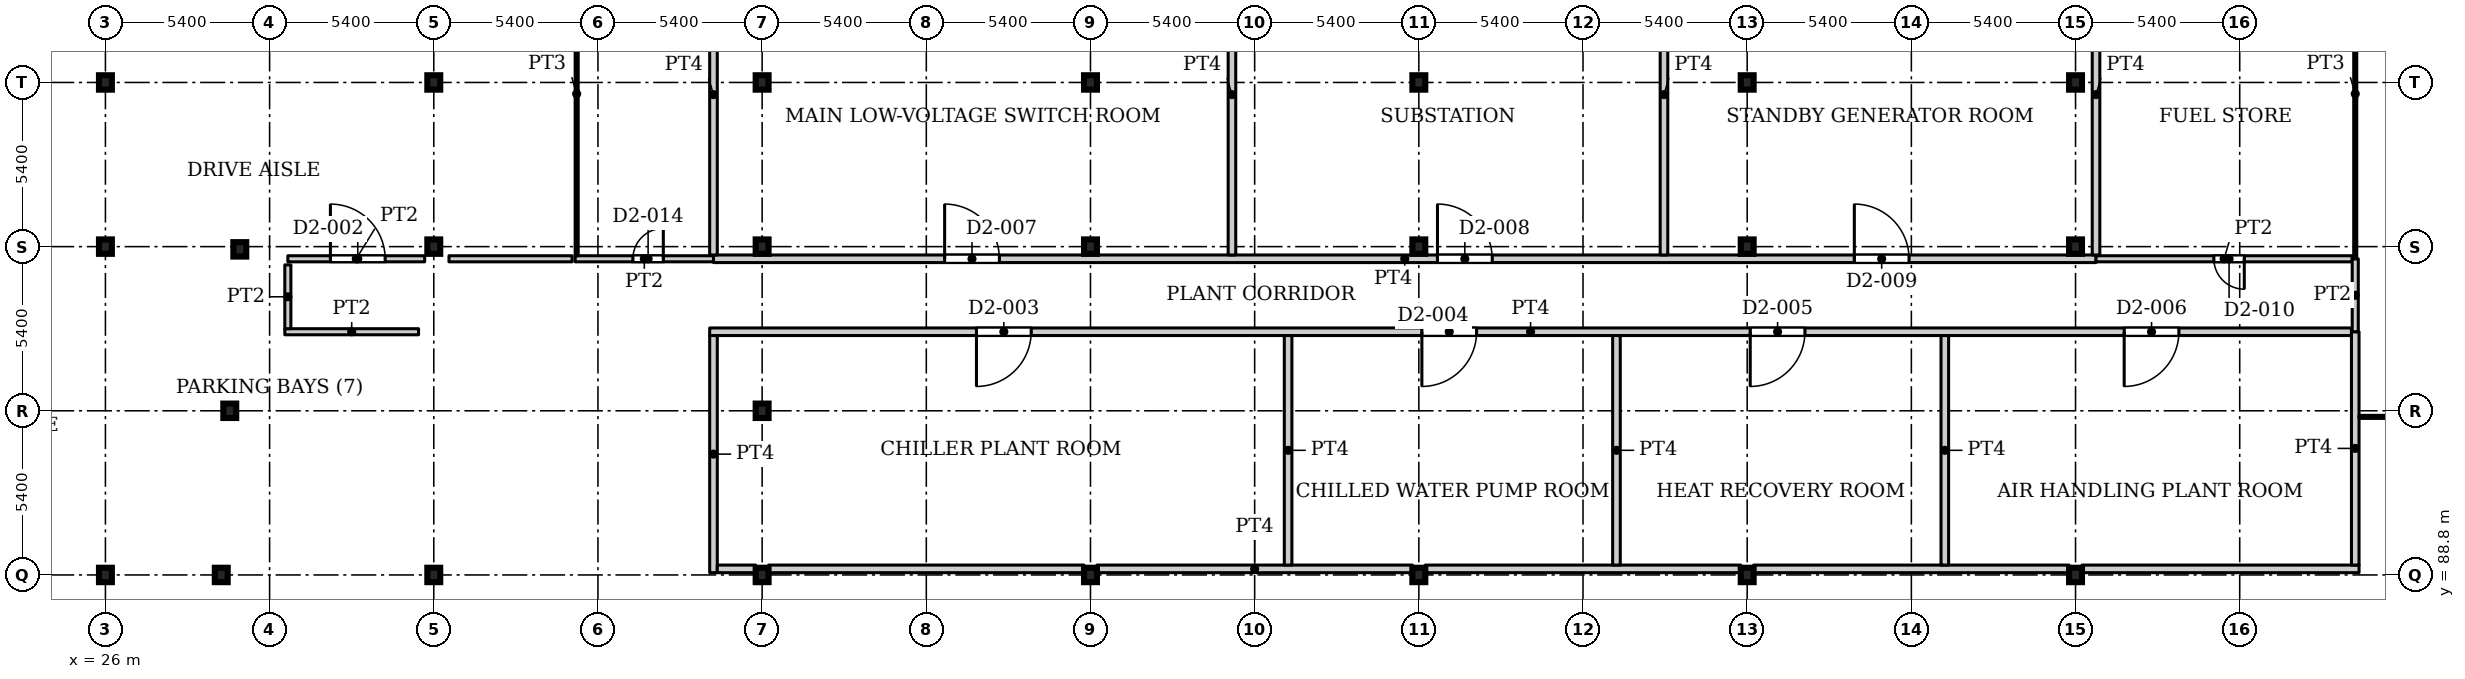
"""IFC4 building model, lengths in metres.
Left out: names, types, materials, properties, quantities, classifications, styles, units other than length and angle.
Written with IfcOpenShell. Run it as: python <this file> out.ifc"""

import sys

from ifc_helpers import new_model, si_unit, direction, frame, frame_2d, origin, origin_2d, place, context, subcontext, project, spatial, rectangle, i_section, extrude, source, transform, mapped, element, fill, save


model = new_model("IFC4")
c1 = context("Model", 3, precision=1e-05, world=origin(), true_north=direction((0.0, 1.0)))
c2 = subcontext(c1, "Body", "Model", "MODEL_VIEW")
j1 = project(units=[si_unit("LENGTHUNIT", "METRE"), si_unit("PLANEANGLEUNIT", "RADIAN")], contexts=[c1])
p1 = place(None, origin())
s1 = spatial("IfcSite", under=j1, at=p1, CompositionType="ELEMENT")
p2 = place(p1, origin())
s2 = spatial("IfcBuilding", under=s1, at=p2, CompositionType="ELEMENT")
p3 = place(p2, frame((0.0, 0.0, -10.0)))
s3 = spatial("IfcBuildingStorey", under=s2, at=p3, CompositionType="ELEMENT", Elevation=-10.0)
for number, where, z_axis, x_axis in (
    (1, (26.0, 88.8, 0.0), (0.0, 0.0, 1.0), (1.0, 0.0, 0.0)),
    (2, (36.8, 88.8, 0.0), (0.0, 0.0, 1.0), (1.0, 0.0, 0.0)),
    (3, (47.6, 88.8, 0.0), (0.0, 0.0, 1.0), (1.0, 0.0, 0.0)),
    (4, (58.4, 88.8, 0.0), (0.0, 0.0, 1.0), (1.0, 0.0, 0.0)),
    (5, (69.2, 88.8, 0.0), (0.0, 0.0, 1.0), (1.0, 0.0, 0.0)),
    (6, (80.0, 88.8, 0.0), (0.0, 0.0, 1.0), (1.0, 0.0, 0.0)),
    (7, (90.8, 88.8, 0.0), (0.0, 0.0, 1.0), (1.0, 0.0, 0.0)),
    (8, (26.0, 99.6, 0.0), (0.0, 0.0, 1.0), (1.0, 0.0, 0.0)),
    (9, (36.8, 99.6, 0.0), (0.0, 0.0, 1.0), (1.0, 0.0, 0.0)),
    (10, (47.6, 99.6, 0.0), (0.0, 0.0, 1.0), (1.0, 0.0, 0.0)),
    (11, (58.4, 99.6, 0.0), (0.0, 0.0, 1.0), (1.0, 0.0, 0.0)),
    (12, (69.2, 99.6, 0.0), (0.0, 0.0, 1.0), (1.0, 0.0, 0.0)),
    (13, (80.0, 99.6, 0.0), (0.0, 0.0, 1.0), (1.0, 0.0, 0.0)),
    (14, (90.8, 99.6, 0.0), (0.0, 0.0, 1.0), (1.0, 0.0, 0.0)),
    (15, (26.0, 105.0, 0.0), (0.0, 0.0, 1.0), (1.0, 0.0, 0.0)),
    (16, (36.8, 105.0, 0.0), (0.0, 0.0, 1.0), (1.0, 0.0, 0.0)),
    (17, (47.6, 105.0, 0.0), (0.0, 0.0, 1.0), (1.0, 0.0, 0.0)),
    (18, (58.4, 105.0, 0.0), (0.0, 0.0, 1.0), (1.0, 0.0, 0.0)),
    (19, (69.2, 105.0, 0.0), (0.0, 0.0, 1.0), (1.0, 0.0, 0.0)),
    (20, (80.0, 105.0, 0.0), (0.0, 0.0, 1.0), (1.0, 0.0, 0.0)),
    (21, (90.8, 105.0, 0.0), (0.0, 0.0, 1.0), (1.0, 0.0, 0.0)),
    (22, (29.81, 88.8, 0.0), (0.0, 0.0, 1.0), (1.0, 0.0, 0.0)),
    (23, (30.09, 94.2, 0.0), (0.0, 0.0, 1.0), (1.0, 0.0, 0.0)),
    (24, (47.6, 94.2, 0.0), (0.0, 0.0, 1.0), (1.0, 0.0, 0.0)),
    (25, (30.42, 99.51, 0.0), (0.0, 0.0, 1.0), (1.0, 0.0, 0.0)),
):
    element("IfcColumn", number, at=place(p3, frame(where, z_axis=z_axis, x_axis=x_axis)), inside=s3, PredefinedType="COLUMN", context=c2, shape_type="SweptSolid", body=[
        extrude(i_section(OverallWidth=0.424, OverallDepth=0.474, WebThickness=0.048, FlangeThickness=0.077, FilletRadius=0.014, at=origin_2d()), origin(), (0.0, 0.0, 1.0), 5.0),
    ])
p4 = place(p3, frame((31.9, 96.8, 0.0), z_axis=(0.0, 0.0, 1.0), x_axis=(1.0, 0.0, 0.0)))
e26 = element("IfcWall", 26, at=p4, inside=s3, PredefinedType="PARTITIONING", context=c2, shape_type="SweptSolid", body=[
    extrude(rectangle(XDim=4.4, YDim=0.2, at=frame_2d((2.2, 0.0))), origin(), (0.0, 0.0, 1.0), 4.58),
])
p5 = place(p3, frame((32.0, 96.9, 0.0), z_axis=(0.0, 0.0, 1.0), x_axis=(0.0, 1.0, 0.0)))
e27 = element("IfcWall", 27, at=p5, inside=s3, PredefinedType="PARTITIONING", context=c2, shape_type="SweptSolid", body=[
    extrude(rectangle(XDim=2.1, YDim=0.2, at=frame_2d((1.05, 0.0))), origin(), (0.0, 0.0, 1.0), 4.58),
])
p6 = place(p3, frame((32.0, 99.2, 0.0), z_axis=(0.0, 0.0, 1.0), x_axis=(1.0, 0.0, 0.0)))
e28 = element("IfcWall", 28, at=p6, inside=s3, PredefinedType="PARTITIONING", context=c2, shape_type="SweptSolid", body=[
    extrude(rectangle(XDim=4.5, YDim=0.2, at=frame_2d((2.25, 0.0))), origin(), (0.0, 0.0, 1.0), 4.58),
])
p7 = place(p6, frame((1.4, 0.0, 0.0)))
e29 = element("IfcOpeningElement", 29, at=p7, cuts=e28, PredefinedType="OPENING", context=c2, shape_type="SweptSolid", body=[
    extrude(rectangle(XDim=1.8, YDim=2.1, at=frame_2d((0.9, 1.05))), frame((0.0, 0.11, 0.0), z_axis=(0.0, -1.0, 0.0), x_axis=(1.0, 0.0, 0.0)), (0.0, 0.0, 1.0), 0.22),
])
p8 = place(p3, frame((37.3, 99.2, 0.0), z_axis=(0.0, 0.0, 1.0), x_axis=(1.0, 0.0, 0.0)))
e30 = element("IfcWall", 30, at=p8, inside=s3, PredefinedType="PARTITIONING", context=c2, shape_type="SweptSolid", body=[
    extrude(rectangle(XDim=4.05, YDim=0.2, at=frame_2d((2.025, 0.0))), origin(), (0.0, 0.0, 1.0), 4.58),
])
p9 = place(p3, frame((41.45, 99.2, 0.0), z_axis=(0.0, 0.0, 1.0), x_axis=(1.0, 0.0, 0.0)))
e31 = element("IfcWall", 31, at=p9, inside=s3, PredefinedType="PARTITIONING", context=c2, shape_type="SweptSolid", body=[
    extrude(rectangle(XDim=4.55, YDim=0.2, at=frame_2d((2.275, 0.0))), origin(), (0.0, 0.0, 1.0), 4.58),
])
p10 = place(p9, frame((1.9, 0.0, 0.0)))
e32 = element("IfcOpeningElement", 32, at=p10, cuts=e31, PredefinedType="OPENING", context=c2, shape_type="SweptSolid", body=[
    extrude(rectangle(XDim=1.0, YDim=2.1, at=frame_2d((0.5, 1.05))), frame((0.0, 0.11, 0.0), z_axis=(0.0, -1.0, 0.0), x_axis=(1.0, 0.0, 0.0)), (0.0, 0.0, 1.0), 0.22),
])
p11 = place(p3, frame((41.5, 99.3, 0.0), z_axis=(0.0, 0.0, 1.0), x_axis=(0.0, 1.0, 0.0)))
e33 = element("IfcWall", 33, at=p11, inside=s3, PredefinedType="PARTITIONING", context=c2, shape_type="SweptSolid", body=[
    extrude(rectangle(XDim=10.65, YDim=0.1, at=frame_2d((5.325, 0.0))), origin(), (0.0, 0.0, 1.0), 4.58),
])
p12 = place(p3, frame((45.875, 96.8, 0.0), z_axis=(0.0, 0.0, 1.0), x_axis=(1.0, 0.0, 0.0)))
e34 = element("IfcWall", 34, at=p12, inside=s3, PredefinedType="PARTITIONING", context=c2, shape_type="SweptSolid", body=[
    extrude(rectangle(XDim=54.0, YDim=0.25, at=frame_2d((27.0, 0.0))), origin(), (0.0, 0.0, 1.0), 4.58),
])
p13 = place(p12, frame((8.775, 0.0, 0.0)))
e35 = element("IfcOpeningElement", 35, at=p13, cuts=e34, PredefinedType="OPENING", context=c2, shape_type="SweptSolid", body=[
    extrude(rectangle(XDim=1.8, YDim=2.1, at=frame_2d((0.9, 1.05))), frame((0.0, 0.135, 0.0), z_axis=(0.0, -1.0, 0.0), x_axis=(1.0, 0.0, 0.0)), (0.0, 0.0, 1.0), 0.27),
])
p14 = place(p12, frame((23.425, 0.0, 0.0)))
e36 = element("IfcOpeningElement", 36, at=p14, cuts=e34, PredefinedType="OPENING", context=c2, shape_type="SweptSolid", body=[
    extrude(rectangle(XDim=1.8, YDim=2.1, at=frame_2d((0.9, 1.05))), frame((0.0, 0.135, 0.0), z_axis=(0.0, -1.0, 0.0), x_axis=(1.0, 0.0, 0.0)), (0.0, 0.0, 1.0), 0.27),
])
p15 = place(p12, frame((34.225, 0.0, 0.0)))
e37 = element("IfcOpeningElement", 37, at=p15, cuts=e34, PredefinedType="OPENING", context=c2, shape_type="SweptSolid", body=[
    extrude(rectangle(XDim=1.8, YDim=2.1, at=frame_2d((0.9, 1.05))), frame((0.0, 0.135, 0.0), z_axis=(0.0, -1.0, 0.0), x_axis=(1.0, 0.0, 0.0)), (0.0, 0.0, 1.0), 0.27),
])
p16 = place(p12, frame((46.525, 0.0, 0.0)))
e38 = element("IfcOpeningElement", 38, at=p16, cuts=e34, PredefinedType="OPENING", context=c2, shape_type="SweptSolid", body=[
    extrude(rectangle(XDim=1.8, YDim=2.1, at=frame_2d((0.9, 1.05))), frame((0.0, 0.135, 0.0), z_axis=(0.0, -1.0, 0.0), x_axis=(1.0, 0.0, 0.0)), (0.0, 0.0, 1.0), 0.27),
])
p17 = place(p3, frame((46.0, 88.875, 0.0), z_axis=(0.0, 0.0, 1.0), x_axis=(0.0, 1.0, 0.0)))
e39 = element("IfcWall", 39, at=p17, inside=s3, PredefinedType="PARTITIONING", context=c2, shape_type="SweptSolid", body=[
    extrude(rectangle(XDim=7.8, YDim=0.25, at=frame_2d((3.9, 0.0))), origin(), (0.0, 0.0, 1.0), 4.58),
])
p18 = place(p3, frame((46.0, 99.2, 0.0), z_axis=(0.0, 0.0, 1.0), x_axis=(1.0, 0.0, 0.0)))
e40 = element("IfcWall", 40, at=p18, inside=s3, PredefinedType="PARTITIONING", context=c2, shape_type="SweptSolid", body=[
    extrude(rectangle(XDim=45.474, YDim=0.25, at=frame_2d((22.737, 0.0))), origin(), (0.0, 0.0, 1.0), 4.58),
])
p19 = place(p18, frame((7.603, 0.0, 0.0)))
e41 = element("IfcOpeningElement", 41, at=p19, cuts=e40, PredefinedType="OPENING", context=c2, shape_type="SweptSolid", body=[
    extrude(rectangle(XDim=1.8, YDim=2.1, at=frame_2d((0.9, 1.05))), frame((0.0, 0.135, 0.0), z_axis=(0.0, -1.0, 0.0), x_axis=(1.0, 0.0, 0.0)), (0.0, 0.0, 1.0), 0.27),
])
p20 = place(p18, frame((23.813, 0.0, 0.0)))
e42 = element("IfcOpeningElement", 42, at=p20, cuts=e40, PredefinedType="OPENING", context=c2, shape_type="SweptSolid", body=[
    extrude(rectangle(XDim=1.8, YDim=2.1, at=frame_2d((0.9, 1.05))), frame((0.0, 0.135, 0.0), z_axis=(0.0, -1.0, 0.0), x_axis=(1.0, 0.0, 0.0)), (0.0, 0.0, 1.0), 0.27),
])
p21 = place(p18, frame((37.524, 0.0, 0.0)))
e43 = element("IfcOpeningElement", 43, at=p21, cuts=e40, PredefinedType="OPENING", context=c2, shape_type="SweptSolid", body=[
    extrude(rectangle(XDim=1.8, YDim=2.1, at=frame_2d((0.9, 1.05))), frame((0.0, 0.135, 0.0), z_axis=(0.0, -1.0, 0.0), x_axis=(1.0, 0.0, 0.0)), (0.0, 0.0, 1.0), 0.27),
])
p22 = place(p3, frame((46.0, 99.325, 0.0), z_axis=(0.0, 0.0, 1.0), x_axis=(0.0, 1.0, 0.0)))
e44 = element("IfcWall", 44, at=p22, inside=s3, PredefinedType="PARTITIONING", context=c2, shape_type="SweptSolid", body=[
    extrude(rectangle(XDim=10.55, YDim=0.25, at=frame_2d((5.275, 0.0))), origin(), (0.0, 0.0, 1.0), 4.58),
])
p23 = place(p3, frame((46.125, 89.0, 0.0), z_axis=(0.0, 0.0, 1.0), x_axis=(1.0, 0.0, 0.0)))
e45 = element("IfcWall", 45, at=p23, inside=s3, PredefinedType="PARTITIONING", context=c2, shape_type="SweptSolid", body=[
    extrude(rectangle(XDim=1.264, YDim=0.25, at=frame_2d((0.632, 0.0))), origin(), (0.0, 0.0, 1.0), 4.58),
])
for number, where, z_axis, x_axis in (
    (46, (47.811, 89.0, 0.0), (0.0, 0.0, 1.0), (1.0, 0.0, 0.0)),
    (47, (58.611, 89.0, 0.0), (0.0, 0.0, 1.0), (1.0, 0.0, 0.0)),
):
    element("IfcWall", number, at=place(p3, frame(where, z_axis=z_axis, x_axis=x_axis)), inside=s3, PredefinedType="PARTITIONING", context=c2, shape_type="SweptSolid", body=[
        extrude(rectangle(XDim=10.378, YDim=0.25, at=frame_2d((5.189, 0.0))), origin(), (0.0, 0.0, 1.0), 4.58),
    ])
p24 = place(p3, frame((63.053, 99.325, 0.0), z_axis=(0.0, 0.0, 1.0), x_axis=(0.0, 1.0, 0.0)))
e48 = element("IfcWall", 48, at=p24, inside=s3, PredefinedType="PARTITIONING", context=c2, shape_type="SweptSolid", body=[
    extrude(rectangle(XDim=10.55, YDim=0.25, at=frame_2d((5.275, 0.0))), origin(), (0.0, 0.0, 1.0), 4.58),
])
p25 = place(p3, frame((64.9, 89.125, 0.0), z_axis=(0.0, 0.0, 1.0), x_axis=(0.0, 1.0, 0.0)))
e49 = element("IfcWall", 49, at=p25, inside=s3, PredefinedType="PARTITIONING", context=c2, shape_type="SweptSolid", body=[
    extrude(rectangle(XDim=7.55, YDim=0.25, at=frame_2d((3.775, 0.0))), origin(), (0.0, 0.0, 1.0), 4.58),
])
p26 = place(p3, frame((69.411, 89.0, 0.0), z_axis=(0.0, 0.0, 1.0), x_axis=(1.0, 0.0, 0.0)))
e50 = element("IfcWall", 50, at=p26, inside=s3, PredefinedType="PARTITIONING", context=c2, shape_type="SweptSolid", body=[
    extrude(rectangle(XDim=10.378, YDim=0.25, at=frame_2d((5.189, 0.0))), origin(), (0.0, 0.0, 1.0), 4.58),
])
p27 = place(p3, frame((75.7, 89.125, 0.0), z_axis=(0.0, 0.0, 1.0), x_axis=(0.0, 1.0, 0.0)))
e51 = element("IfcWall", 51, at=p27, inside=s3, PredefinedType="PARTITIONING", context=c2, shape_type="SweptSolid", body=[
    extrude(rectangle(XDim=7.55, YDim=0.25, at=frame_2d((3.775, 0.0))), origin(), (0.0, 0.0, 1.0), 4.58),
])
p28 = place(p3, frame((77.263, 99.325, 0.0), z_axis=(0.0, 0.0, 1.0), x_axis=(0.0, 1.0, 0.0)))
e52 = element("IfcWall", 52, at=p28, inside=s3, PredefinedType="PARTITIONING", context=c2, shape_type="SweptSolid", body=[
    extrude(rectangle(XDim=10.55, YDim=0.25, at=frame_2d((5.275, 0.0))), origin(), (0.0, 0.0, 1.0), 4.58),
])
p29 = place(p3, frame((80.211, 89.0, 0.0), z_axis=(0.0, 0.0, 1.0), x_axis=(1.0, 0.0, 0.0)))
e53 = element("IfcWall", 53, at=p29, inside=s3, PredefinedType="PARTITIONING", context=c2, shape_type="SweptSolid", body=[
    extrude(rectangle(XDim=10.378, YDim=0.25, at=frame_2d((5.189, 0.0))), origin(), (0.0, 0.0, 1.0), 4.58),
])
p30 = place(p3, frame((86.5, 89.125, 0.0), z_axis=(0.0, 0.0, 1.0), x_axis=(0.0, 1.0, 0.0)))
e54 = element("IfcWall", 54, at=p30, inside=s3, PredefinedType="PARTITIONING", context=c2, shape_type="SweptSolid", body=[
    extrude(rectangle(XDim=7.55, YDim=0.25, at=frame_2d((3.775, 0.0))), origin(), (0.0, 0.0, 1.0), 4.58),
])
p31 = place(p3, frame((91.011, 89.0, 0.0), z_axis=(0.0, 0.0, 1.0), x_axis=(1.0, 0.0, 0.0)))
e55 = element("IfcWall", 55, at=p31, inside=s3, PredefinedType="PARTITIONING", context=c2, shape_type="SweptSolid", body=[
    extrude(rectangle(XDim=9.114, YDim=0.25, at=frame_2d((4.557, 0.0))), origin(), (0.0, 0.0, 1.0), 4.58),
])
p32 = place(p3, frame((91.474, 99.2, 0.0), z_axis=(0.0, 0.0, 1.0), x_axis=(1.0, 0.0, 0.0)))
e56 = element("IfcWall", 56, at=p32, inside=s3, PredefinedType="PARTITIONING", context=c2, shape_type="SweptSolid", body=[
    extrude(rectangle(XDim=8.426, YDim=0.2, at=frame_2d((4.213, 0.0))), origin(), (0.0, 0.0, 1.0), 4.58),
])
p33 = place(p32, frame((3.876, 0.0, 0.0)))
e57 = element("IfcOpeningElement", 57, at=p33, cuts=e56, PredefinedType="OPENING", context=c2, shape_type="SweptSolid", body=[
    extrude(rectangle(XDim=1.0, YDim=2.1, at=frame_2d((0.5, 1.05))), frame((0.0, 0.11, 0.0), z_axis=(0.0, -1.0, 0.0), x_axis=(1.0, 0.0, 0.0)), (0.0, 0.0, 1.0), 0.22),
])
p34 = place(p3, frame((91.474, 99.325, 0.0), z_axis=(0.0, 0.0, 1.0), x_axis=(0.0, 1.0, 0.0)))
e58 = element("IfcWall", 58, at=p34, inside=s3, PredefinedType="PARTITIONING", context=c2, shape_type="SweptSolid", body=[
    extrude(rectangle(XDim=10.55, YDim=0.25, at=frame_2d((5.275, 0.0))), origin(), (0.0, 0.0, 1.0), 4.58),
])
p35 = place(p3, frame((100.0, 89.125, 0.0), z_axis=(0.0, 0.0, 1.0), x_axis=(0.0, 1.0, 0.0)))
e59 = element("IfcWall", 59, at=p35, inside=s3, PredefinedType="PARTITIONING", context=c2, shape_type="SweptSolid", body=[
    extrude(rectangle(XDim=7.675, YDim=0.25, at=frame_2d((3.837, 0.0))), origin(), (0.0, 0.0, 1.0), 4.58),
])
p36 = place(p3, frame((100.0, 96.8, 0.0), z_axis=(0.0, 0.0, 1.0), x_axis=(0.0, 1.0, 0.0)))
e60 = element("IfcWall", 60, at=p36, inside=s3, PredefinedType="PARTITIONING", context=c2, shape_type="SweptSolid", body=[
    extrude(rectangle(XDim=2.4, YDim=0.2, at=frame_2d((1.2, 0.0))), origin(), (0.0, 0.0, 1.0), 4.58),
])
p37 = place(p3, frame((100.0, 99.2, 0.0), z_axis=(0.0, 0.0, 1.0), x_axis=(0.0, 1.0, 0.0)))
e61 = element("IfcWall", 61, at=p37, inside=s3, PredefinedType="PARTITIONING", context=c2, shape_type="SweptSolid", body=[
    extrude(rectangle(XDim=10.85, YDim=0.1, at=frame_2d((5.425, 0.0))), origin(), (0.0, 0.0, 1.0), 4.58),
])
p38 = place(p3, frame((100.125, 94.0, 0.0), z_axis=(0.0, 0.0, 1.0), x_axis=(1.0, 0.0, 0.0)))
e62 = element("IfcWall", 62, at=p38, inside=s3, PredefinedType="PARTITIONING", context=c2, shape_type="SweptSolid", body=[
    extrude(rectangle(XDim=3.825, YDim=0.1, at=frame_2d((1.913, 0.0))), origin(), (0.0, 0.0, 1.0), 4.58),
])
m1 = source(origin(), c2, "Body", "SweptSolid", [
    extrude(rectangle(XDim=1.8, YDim=2.1, at=frame_2d((0.9, 1.05))), frame((0.0, 0.025, 0.0), z_axis=(0.0, -1.0, 0.0), x_axis=(1.0, 0.0, 0.0)), (0.0, 0.0, 1.0), 0.05),
])
p39 = place(p7, origin())
e63 = element("IfcDoor", 63, at=p39, inside=s3, OperationType="DOUBLE_DOOR_SINGLE_SWING", PredefinedType="DOOR", context=c2, shape_type="MappedRepresentation", body=[
    mapped(m1, transform((0.0, 0.0, 0.0), x_axis=(1.0, 0.0, 0.0), y_axis=(0.0, 1.0, 0.0), z_axis=(0.0, 0.0, 1.0), scale=1.0)),
])
fill(e29, e63)
m2 = source(origin(), c2, "Body", "SweptSolid", [
    extrude(rectangle(XDim=1.8, YDim=2.1, at=frame_2d((0.9, 1.05))), frame((0.0, 0.025, 0.0), z_axis=(0.0, -1.0, 0.0), x_axis=(1.0, 0.0, 0.0)), (0.0, 0.0, 1.0), 0.05),
])
p40 = place(p13, origin())
e64 = element("IfcDoor", 64, at=p40, inside=s3, OperationType="DOUBLE_DOOR_SINGLE_SWING", PredefinedType="DOOR", context=c2, shape_type="MappedRepresentation", body=[
    mapped(m2, transform((0.0, 0.0, 0.0), x_axis=(1.0, 0.0, 0.0), y_axis=(0.0, 1.0, 0.0), z_axis=(0.0, 0.0, 1.0), scale=1.0)),
])
fill(e35, e64)
p41 = place(p14, origin())
e65 = element("IfcDoor", 65, at=p41, inside=s3, OperationType="DOUBLE_DOOR_SINGLE_SWING", PredefinedType="DOOR", context=c2, shape_type="MappedRepresentation", body=[
    mapped(m2, transform((0.0, 0.0, 0.0), x_axis=(1.0, 0.0, 0.0), y_axis=(0.0, 1.0, 0.0), z_axis=(0.0, 0.0, 1.0), scale=1.0)),
])
fill(e36, e65)
p42 = place(p15, origin())
e66 = element("IfcDoor", 66, at=p42, inside=s3, OperationType="DOUBLE_DOOR_SINGLE_SWING", PredefinedType="DOOR", context=c2, shape_type="MappedRepresentation", body=[
    mapped(m2, transform((0.0, 0.0, 0.0), x_axis=(1.0, 0.0, 0.0), y_axis=(0.0, 1.0, 0.0), z_axis=(0.0, 0.0, 1.0), scale=1.0)),
])
fill(e37, e66)
p43 = place(p16, origin())
e67 = element("IfcDoor", 67, at=p43, inside=s3, OperationType="DOUBLE_DOOR_SINGLE_SWING", PredefinedType="DOOR", context=c2, shape_type="MappedRepresentation", body=[
    mapped(m2, transform((0.0, 0.0, 0.0), x_axis=(1.0, 0.0, 0.0), y_axis=(0.0, 1.0, 0.0), z_axis=(0.0, 0.0, 1.0), scale=1.0)),
])
fill(e38, e67)
p44 = place(p19, origin())
e68 = element("IfcDoor", 68, at=p44, inside=s3, OperationType="DOUBLE_DOOR_SINGLE_SWING", PredefinedType="DOOR", context=c2, shape_type="MappedRepresentation", body=[
    mapped(m2, transform((0.0, 0.0, 0.0), x_axis=(1.0, 0.0, 0.0), y_axis=(0.0, 1.0, 0.0), z_axis=(0.0, 0.0, 1.0), scale=1.0)),
])
fill(e41, e68)
p45 = place(p20, origin())
e69 = element("IfcDoor", 69, at=p45, inside=s3, OperationType="DOUBLE_DOOR_SINGLE_SWING", PredefinedType="DOOR", context=c2, shape_type="MappedRepresentation", body=[
    mapped(m2, transform((0.0, 0.0, 0.0), x_axis=(1.0, 0.0, 0.0), y_axis=(0.0, 1.0, 0.0), z_axis=(0.0, 0.0, 1.0), scale=1.0)),
])
fill(e42, e69)
p46 = place(p21, origin())
e70 = element("IfcDoor", 70, at=p46, inside=s3, OperationType="DOUBLE_DOOR_SINGLE_SWING", PredefinedType="DOOR", context=c2, shape_type="MappedRepresentation", body=[
    mapped(m2, transform((0.0, 0.0, 0.0), x_axis=(1.0, 0.0, 0.0), y_axis=(0.0, 1.0, 0.0), z_axis=(0.0, 0.0, 1.0), scale=1.0)),
])
fill(e43, e70)
m3 = source(origin(), c2, "Body", "SweptSolid", [
    extrude(rectangle(XDim=1.0, YDim=2.1, at=frame_2d((0.5, 1.05))), frame((0.0, 0.025, 0.0), z_axis=(0.0, -1.0, 0.0), x_axis=(1.0, 0.0, 0.0)), (0.0, 0.0, 1.0), 0.05),
])
p47 = place(p33, origin())
e71 = element("IfcDoor", 71, at=p47, inside=s3, OperationType="SINGLE_SWING_RIGHT", PredefinedType="DOOR", context=c2, shape_type="MappedRepresentation", body=[
    mapped(m3, transform((0.0, 0.0, 0.0), x_axis=(1.0, 0.0, 0.0), y_axis=(0.0, 1.0, 0.0), z_axis=(0.0, 0.0, 1.0), scale=1.0)),
])
fill(e57, e71)
p48 = place(p10, origin())
e72 = element("IfcDoor", 72, at=p48, inside=s3, OperationType="SINGLE_SWING_LEFT", PredefinedType="DOOR", context=c2, shape_type="MappedRepresentation", body=[
    mapped(m3, transform((0.0, 0.0, 0.0), x_axis=(1.0, 0.0, 0.0), y_axis=(0.0, 1.0, 0.0), z_axis=(0.0, 0.0, 1.0), scale=1.0)),
])
fill(e32, e72)
save(model, sys.argv[1])
